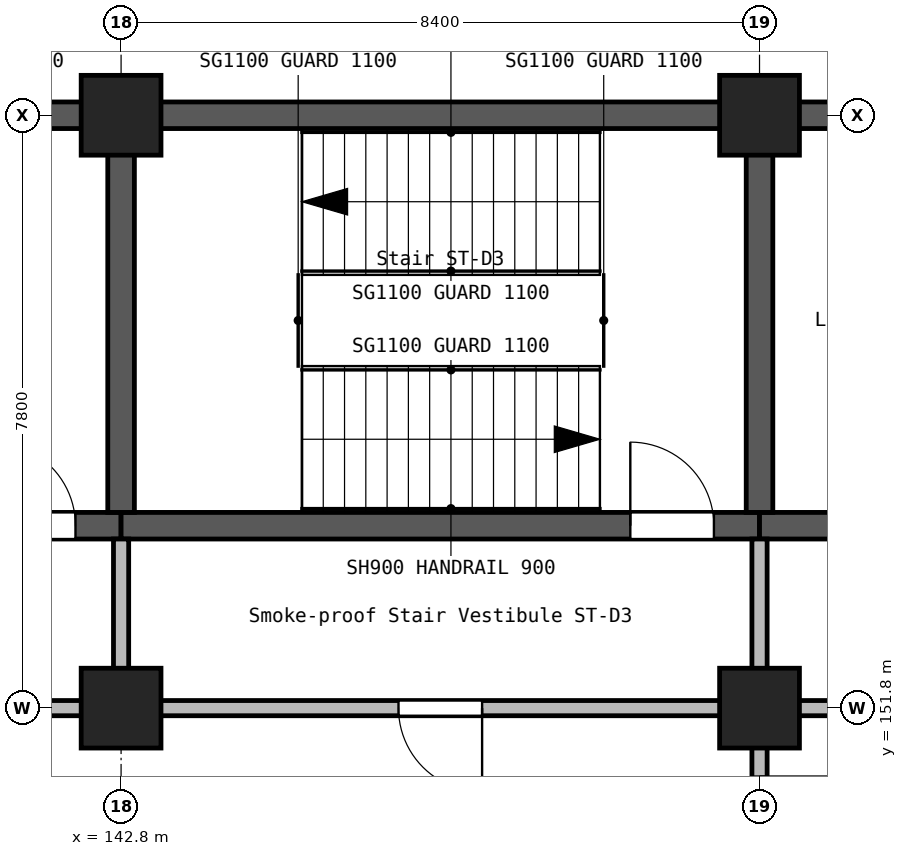
"""IFC4 building model, lengths in metres.
Left out: names, types, materials, properties, quantities, classifications, styles, units other than length and angle.
Written with IfcOpenShell. Run it as: python <this file> out.ifc"""

import sys

from ifc_helpers import new_model, si_unit, direction, frame, frame_2d, origin, origin_2d, place, context, subcontext, project, spatial, rectangle, extrude, element, fill, save


model = new_model("IFC4")
c1 = context("Model", 3, precision=1e-05, world=origin(), true_north=direction((0.0, 1.0)))
c2 = subcontext(c1, "Body", "Model", "MODEL_VIEW")
j1 = project(units=[si_unit("LENGTHUNIT", "METRE"), si_unit("PLANEANGLEUNIT", "RADIAN")], contexts=[c1])
p1 = place(None, origin())
s1 = spatial("IfcSite", under=j1, at=p1, CompositionType="ELEMENT")
p2 = place(p1, origin())
s2 = spatial("IfcBuilding", under=s1, at=p2, CompositionType="ELEMENT")
p3 = place(p2, frame((0.0, 0.0, 5.4)))
s3 = spatial("IfcBuildingStorey", under=s2, at=p3, CompositionType="ELEMENT", Elevation=5.4)
for number, where, z_axis, x_axis in (
    (1, (142.8, 151.8, 0.0), (0.0, 0.0, 1.0), (1.0, 0.0, 0.0)),
    (2, (142.8, 159.6, 0.0), (0.0, 0.0, 1.0), (1.0, 0.0, 0.0)),
    (3, (151.2, 151.8, 0.0), (0.0, 0.0, 1.0), (1.0, 0.0, 0.0)),
    (4, (151.2, 159.6, 0.0), (0.0, 0.0, 1.0), (1.0, 0.0, 0.0)),
):
    element("IfcColumn", number, at=place(p3, frame(where, z_axis=z_axis, x_axis=x_axis)), inside=s3, PredefinedType="COLUMN", context=c2, shape_type="SweptSolid", body=[
        extrude(rectangle(XDim=1.05, YDim=1.05, at=origin_2d()), origin(), (0.0, 0.0, 1.0), 4.5),
    ])
p4 = place(p3, frame((134.225, 159.6, 0.0), z_axis=(0.0, 0.0, 1.0), x_axis=(1.0, 0.0, 0.0)))
e5 = element("IfcWall", 5, at=p4, inside=s3, PredefinedType="SHEAR", context=c2, shape_type="SweptSolid", body=[
    extrude(rectangle(XDim=8.575, YDim=0.35, at=frame_2d((4.288, 0.0))), origin(), (0.0, 0.0, 1.0), 4.5),
])
p5 = place(p3, frame((134.575, 154.2, 0.0), z_axis=(0.0, 0.0, 1.0), x_axis=(1.0, 0.0, 0.0)))
e6 = element("IfcWall", 6, at=p5, inside=s3, PredefinedType="SHEAR", context=c2, shape_type="SweptSolid", body=[
    extrude(rectangle(XDim=8.225, YDim=0.35, at=frame_2d((4.113, 0.0))), origin(), (0.0, 0.0, 1.0), 4.5),
])
p6 = place(p5, frame((6.525, 0.0, 0.0)))
e7 = element("IfcOpeningElement", 7, at=p6, cuts=e6, PredefinedType="OPENING", context=c2, shape_type="SweptSolid", body=[
    extrude(rectangle(XDim=1.1, YDim=2.1, at=frame_2d((0.55, 1.05))), frame((0.0, 0.185, 0.0), z_axis=(0.0, -1.0, 0.0), x_axis=(1.0, 0.0, 0.0)), (0.0, 0.0, 1.0), 0.37),
])
p7 = place(p3, frame((142.8, 154.2, 0.0), z_axis=(0.0, 0.0, 1.0), x_axis=(1.0, 0.0, 0.0)))
e8 = element("IfcWall", 8, at=p7, inside=s3, PredefinedType="SHEAR", context=c2, shape_type="SweptSolid", body=[
    extrude(rectangle(XDim=8.4, YDim=0.35, at=frame_2d((4.2, 0.0))), origin(), (0.0, 0.0, 1.0), 4.5),
])
p8 = place(p7, frame((6.7, 0.0, 0.0)))
e9 = element("IfcOpeningElement", 9, at=p8, cuts=e8, PredefinedType="OPENING", context=c2, shape_type="SweptSolid", body=[
    extrude(rectangle(XDim=1.1, YDim=2.1, at=frame_2d((0.55, 1.05))), frame((0.0, 0.185, 0.0), z_axis=(0.0, -1.0, 0.0), x_axis=(1.0, 0.0, 0.0)), (0.0, 0.0, 1.0), 0.37),
])
p9 = place(p3, frame((142.8, 154.375, 0.0), z_axis=(0.0, 0.0, 1.0), x_axis=(0.0, 1.0, 0.0)))
e10 = element("IfcWall", 10, at=p9, inside=s3, PredefinedType="SHEAR", context=c2, shape_type="SweptSolid", body=[
    extrude(rectangle(XDim=5.05, YDim=0.35, at=frame_2d((2.525, 0.0))), origin(), (0.0, 0.0, 1.0), 4.5),
])
p10 = place(p3, frame((142.8, 159.6, 0.0), z_axis=(0.0, 0.0, 1.0), x_axis=(1.0, 0.0, 0.0)))
e11 = element("IfcWall", 11, at=p10, inside=s3, PredefinedType="SHEAR", context=c2, shape_type="SweptSolid", body=[
    extrude(rectangle(XDim=8.4, YDim=0.35, at=frame_2d((4.2, 0.0))), origin(), (0.0, 0.0, 1.0), 4.5),
])
p11 = place(p3, frame((151.2, 154.2, 0.0), z_axis=(0.0, 0.0, 1.0), x_axis=(1.0, 0.0, 0.0)))
e12 = element("IfcWall", 12, at=p11, inside=s3, PredefinedType="SHEAR", context=c2, shape_type="SweptSolid", body=[
    extrude(rectangle(XDim=4.2, YDim=0.35, at=frame_2d((2.1, 0.0))), origin(), (0.0, 0.0, 1.0), 4.5),
])
p12 = place(p11, frame((1.55, 0.0, 0.0)))
e13 = element("IfcOpeningElement", 13, at=p12, cuts=e12, PredefinedType="OPENING", context=c2, shape_type="SweptSolid", body=[
    extrude(rectangle(XDim=1.1, YDim=2.1, at=frame_2d((0.55, 1.05))), frame((0.0, 0.185, 0.0), z_axis=(0.0, -1.0, 0.0), x_axis=(1.0, 0.0, 0.0)), (0.0, 0.0, 1.0), 0.37),
])
p13 = place(p3, frame((151.2, 154.375, 0.0), z_axis=(0.0, 0.0, 1.0), x_axis=(0.0, 1.0, 0.0)))
e14 = element("IfcWall", 14, at=p13, inside=s3, PredefinedType="SHEAR", context=c2, shape_type="SweptSolid", body=[
    extrude(rectangle(XDim=5.05, YDim=0.35, at=frame_2d((2.525, 0.0))), origin(), (0.0, 0.0, 1.0), 4.5),
])
p14 = place(p3, frame((151.2, 159.6, 0.0), z_axis=(0.0, 0.0, 1.0), x_axis=(1.0, 0.0, 0.0)))
e15 = element("IfcWall", 15, at=p14, inside=s3, PredefinedType="SHEAR", context=c2, shape_type="SweptSolid", body=[
    extrude(rectangle(XDim=4.2, YDim=0.35, at=frame_2d((2.1, 0.0))), origin(), (0.0, 0.0, 1.0), 4.5),
])
p15 = place(p3, frame((159.1, 151.8, 0.0), z_axis=(0.0, 0.0, 1.0), x_axis=(-1.0, 0.0, 0.0)))
e16 = element("IfcWall", 16, at=p15, inside=s3, PredefinedType="SOLIDWALL", context=c2, shape_type="SweptSolid", body=[
    extrude(rectangle(XDim=7.4, YDim=0.2, at=frame_2d((3.7, 0.0))), origin(), (0.0, 0.0, 1.0), 4.25),
])
p16 = place(p15, frame((2.8, 0.0, 0.0)))
e17 = element("IfcOpeningElement", 17, at=p16, cuts=e16, PredefinedType="OPENING", context=c2, shape_type="SweptSolid", body=[
    extrude(rectangle(XDim=1.8, YDim=2.1, at=frame_2d((0.9, 1.05))), frame((0.0, 0.11, 0.0), z_axis=(0.0, -1.0, 0.0), x_axis=(1.0, 0.0, 0.0)), (0.0, 0.0, 1.0), 0.22),
])
p17 = place(p3, frame((150.7, 151.8, 0.0), z_axis=(0.0, 0.0, 1.0), x_axis=(-1.0, 0.0, 0.0)))
e18 = element("IfcWall", 18, at=p17, inside=s3, PredefinedType="SOLIDWALL", context=c2, shape_type="SweptSolid", body=[
    extrude(rectangle(XDim=7.4, YDim=0.2, at=frame_2d((3.7, 0.0))), origin(), (0.0, 0.0, 1.0), 4.25),
])
p18 = place(p17, frame((3.15, 0.0, 0.0)))
e19 = element("IfcOpeningElement", 19, at=p18, cuts=e18, PredefinedType="OPENING", context=c2, shape_type="SweptSolid", body=[
    extrude(rectangle(XDim=1.1, YDim=2.1, at=frame_2d((0.55, 1.05))), frame((0.0, 0.11, 0.0), z_axis=(0.0, -1.0, 0.0), x_axis=(1.0, 0.0, 0.0)), (0.0, 0.0, 1.0), 0.22),
])
p19 = place(p3, frame((142.3, 151.8, 0.0), z_axis=(0.0, 0.0, 1.0), x_axis=(-1.0, 0.0, 0.0)))
e20 = element("IfcWall", 20, at=p19, inside=s3, PredefinedType="SOLIDWALL", context=c2, shape_type="SweptSolid", body=[
    extrude(rectangle(XDim=7.4, YDim=0.2, at=frame_2d((3.7, 0.0))), origin(), (0.0, 0.0, 1.0), 4.25),
])
p20 = place(p19, frame((3.15, 0.0, 0.0)))
e21 = element("IfcOpeningElement", 21, at=p20, cuts=e20, PredefinedType="OPENING", context=c2, shape_type="SweptSolid", body=[
    extrude(rectangle(XDim=1.1, YDim=2.1, at=frame_2d((0.55, 1.05))), frame((0.0, 0.11, 0.0), z_axis=(0.0, -1.0, 0.0), x_axis=(1.0, 0.0, 0.0)), (0.0, 0.0, 1.0), 0.22),
])
p21 = place(p3, frame((151.2, 154.025, 0.0), z_axis=(0.0, 0.0, 1.0), x_axis=(0.0, -1.0, 0.0)))
e22 = element("IfcWall", 22, at=p21, inside=s3, PredefinedType="SOLIDWALL", context=c2, shape_type="SweptSolid", body=[
    extrude(rectangle(XDim=1.725, YDim=0.2, at=frame_2d((0.862, 0.0))), origin(), (0.0, 0.0, 1.0), 4.25),
])
p22 = place(p3, frame((151.2, 151.3, 0.0), z_axis=(0.0, 0.0, 1.0), x_axis=(0.0, -1.0, 0.0)))
e23 = element("IfcWall", 23, at=p22, inside=s3, PredefinedType="SOLIDWALL", context=c2, shape_type="SweptSolid", body=[
    extrude(rectangle(XDim=2.6, YDim=0.2, at=frame_2d((1.3, 0.0))), origin(), (0.0, 0.0, 1.0), 4.25),
])
p23 = place(p22, frame((0.4, 0.0, 0.0)))
e24 = element("IfcOpeningElement", 24, at=p23, cuts=e23, PredefinedType="OPENING", context=c2, shape_type="SweptSolid", body=[
    extrude(rectangle(XDim=1.8, YDim=2.1, at=frame_2d((0.9, 1.05))), frame((0.0, 0.11, 0.0), z_axis=(0.0, -1.0, 0.0), x_axis=(1.0, 0.0, 0.0)), (0.0, 0.0, 1.0), 0.22),
])
p24 = place(p3, frame((142.8, 152.3, 0.0), z_axis=(0.0, 0.0, 1.0), x_axis=(0.0, 1.0, 0.0)))
e25 = element("IfcWall", 25, at=p24, inside=s3, PredefinedType="SOLIDWALL", context=c2, shape_type="SweptSolid", body=[
    extrude(rectangle(XDim=1.725, YDim=0.2, at=frame_2d((0.862, 0.0))), origin(), (0.0, 0.0, 1.0), 4.25),
])
p25 = place(p23, frame((1.8, 0.0, 0.0), z_axis=(0.0, 0.0, 1.0), x_axis=(-1.0, 0.0, 0.0)))
e26 = element("IfcDoor", 26, at=p25, inside=s3, OperationType="DOUBLE_DOOR_SINGLE_SWING", PredefinedType="DOOR", context=c2, shape_type="SweptSolid", body=[
    extrude(rectangle(XDim=1.8, YDim=2.1, at=frame_2d((0.9, 1.05))), frame((0.0, 0.025, 0.0), z_axis=(0.0, -1.0, 0.0), x_axis=(1.0, 0.0, 0.0)), (0.0, 0.0, 1.0), 0.05),
])
fill(e24, e26)
p26 = place(p6, origin())
e27 = element("IfcDoor", 27, at=p26, inside=s3, OperationType="SINGLE_SWING_RIGHT", PredefinedType="DOOR", context=c2, shape_type="SweptSolid", body=[
    extrude(rectangle(XDim=1.1, YDim=2.1, at=frame_2d((0.55, 1.05))), frame((0.0, 0.025, 0.0), z_axis=(0.0, -1.0, 0.0), x_axis=(1.0, 0.0, 0.0)), (0.0, 0.0, 1.0), 0.05),
])
fill(e7, e27)
p27 = place(p8, origin())
e28 = element("IfcDoor", 28, at=p27, inside=s3, OperationType="SINGLE_SWING_RIGHT", PredefinedType="DOOR", context=c2, shape_type="SweptSolid", body=[
    extrude(rectangle(XDim=1.1, YDim=2.1, at=frame_2d((0.55, 1.05))), frame((0.0, 0.025, 0.0), z_axis=(0.0, -1.0, 0.0), x_axis=(1.0, 0.0, 0.0)), (0.0, 0.0, 1.0), 0.05),
])
fill(e9, e28)
p28 = place(p18, frame((1.1, 0.0, 0.0), z_axis=(0.0, 0.0, 1.0), x_axis=(-1.0, 0.0, 0.0)))
e29 = element("IfcDoor", 29, at=p28, inside=s3, OperationType="SINGLE_SWING_RIGHT", PredefinedType="DOOR", context=c2, shape_type="SweptSolid", body=[
    extrude(rectangle(XDim=1.1, YDim=2.1, at=frame_2d((0.55, 1.05))), frame((0.0, 0.025, 0.0), z_axis=(0.0, -1.0, 0.0), x_axis=(1.0, 0.0, 0.0)), (0.0, 0.0, 1.0), 0.05),
])
fill(e19, e29)
save(model, sys.argv[1])
